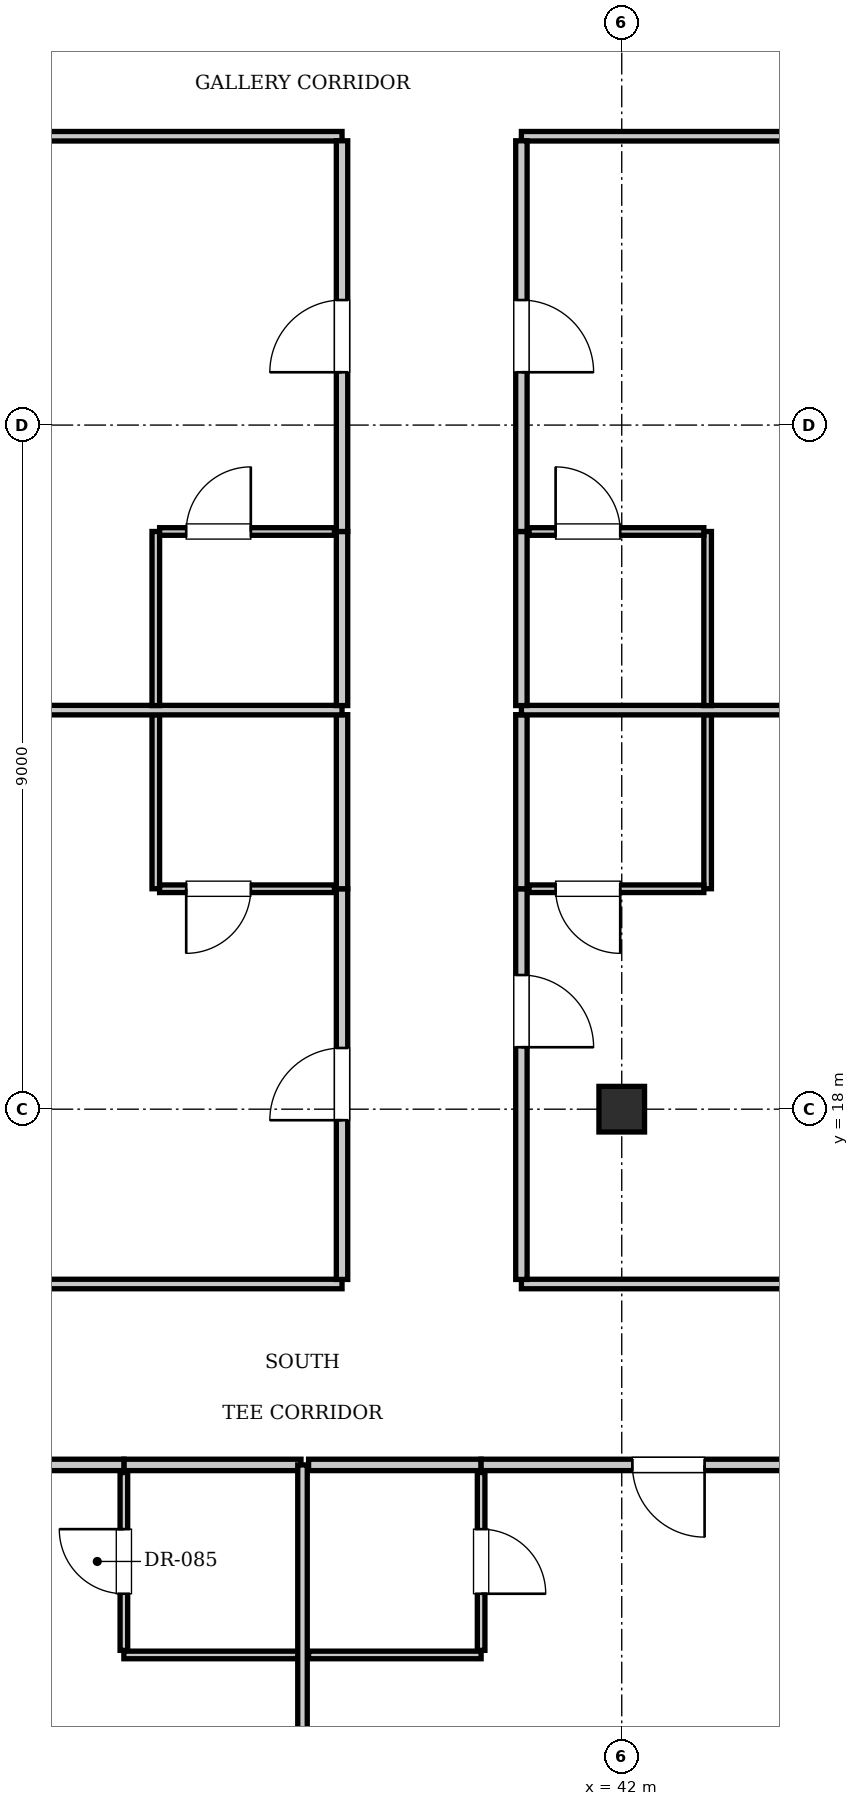
"""IFC4 building model, lengths in metres.
Left out: names, types, materials, properties, quantities, classifications, styles, units other than length and angle.
Written with IfcOpenShell. Run it as: python <this file> out.ifc"""

import sys

from ifc_helpers import new_model, si_unit, direction, frame, frame_2d, origin, origin_2d, place, context, subcontext, project, spatial, rectangle, i_section, extrude, element, fill, save


model = new_model("IFC4")
c1 = context("Model", 3, precision=1e-05, world=origin(), true_north=direction((0.0, 1.0)))
c2 = subcontext(c1, "Body", "Model", "MODEL_VIEW")
j1 = project(units=[si_unit("LENGTHUNIT", "METRE"), si_unit("PLANEANGLEUNIT", "RADIAN")], contexts=[c1])
p1 = place(None, origin())
s1 = spatial("IfcSite", under=j1, at=p1, CompositionType="ELEMENT")
p2 = place(p1, origin())
s2 = spatial("IfcBuilding", under=s1, at=p2, CompositionType="ELEMENT")
p3 = place(p2, frame((0.0, 0.0, 204.4)))
s3 = spatial("IfcBuildingStorey", under=s2, at=p3, CompositionType="ELEMENT", Elevation=204.4)
p4 = place(p3, frame((42.0, 18.0, 0.0), z_axis=(0.0, 0.0, 1.0), x_axis=(1.0, 0.0, 0.0)))
e1 = element("IfcColumn", 1, at=p4, inside=s3, PredefinedType="COLUMN", context=c2, shape_type="SweptSolid", body=[
    extrude(i_section(OverallWidth=0.6, OverallDepth=0.6, WebThickness=0.025, FlangeThickness=0.038, at=origin_2d()), origin(), (0.0, 0.0, 1.0), 3.85),
])
p5 = place(p3, frame((35.45, 13.32, 0.0), z_axis=(0.0, 0.0, 1.0), x_axis=(1.0, 0.0, 0.0)))
e2 = element("IfcWall", 2, at=p5, inside=s3, PredefinedType="PARTITIONING", context=c2, shape_type="SweptSolid", body=[
    extrude(rectangle(XDim=2.33, YDim=0.15, at=frame_2d((1.165, 0.0))), origin(), (0.0, 0.0, 1.0), 3.61),
])
p6 = place(p3, frame((35.45, 10.82, 0.0), z_axis=(0.0, 0.0, 1.0), x_axis=(1.0, 0.0, 0.0)))
e3 = element("IfcWall", 3, at=p6, inside=s3, PredefinedType="PARTITIONING", context=c2, shape_type="SweptSolid", body=[
    extrude(rectangle(XDim=2.31, YDim=0.1, at=frame_2d((1.155, 0.0))), origin(), (0.0, 0.0, 1.0), 3.61),
])
p7 = place(p3, frame((35.45, 10.88, 0.0), z_axis=(0.0, 0.0, 1.0), x_axis=(0.0, 1.0, 0.0)))
e4 = element("IfcWall", 4, at=p7, inside=s3, PredefinedType="PARTITIONING", context=c2, shape_type="SweptSolid", body=[
    extrude(rectangle(XDim=2.34, YDim=0.1, at=frame_2d((1.17, 0.0))), origin(), (0.0, 0.0, 1.0), 3.61),
])
p8 = place(p7, frame((0.745, 0.0, 0.0)))
e5 = element("IfcOpeningElement", 5, at=p8, cuts=e4, PredefinedType="OPENING", context=c2, shape_type="SweptSolid", body=[
    extrude(rectangle(XDim=0.85, YDim=2.1, at=frame_2d((0.425, 1.05))), frame((0.0, 0.06, 0.0), z_axis=(0.0, -1.0, 0.0), x_axis=(1.0, 0.0, 0.0)), (0.0, 0.0, 1.0), 0.12),
])
p9 = place(p3, frame((30.58, 13.32, 0.0), z_axis=(0.0, 0.0, 1.0), x_axis=(1.0, 0.0, 0.0)))
e6 = element("IfcWall", 6, at=p9, inside=s3, PredefinedType="PARTITIONING", context=c2, shape_type="SweptSolid", body=[
    extrude(rectangle(XDim=4.87, YDim=0.15, at=frame_2d((2.435, 0.0))), origin(), (0.0, 0.0, 1.0), 3.61),
])
p10 = place(p9, frame((1.96, 0.0, 0.0)))
e7 = element("IfcOpeningElement", 7, at=p10, cuts=e6, PredefinedType="OPENING", context=c2, shape_type="SweptSolid", body=[
    extrude(rectangle(XDim=0.95, YDim=2.15, at=frame_2d((0.475, 1.075))), frame((0.0, 0.085, 0.0), z_axis=(0.0, -1.0, 0.0), x_axis=(1.0, 0.0, 0.0)), (0.0, 0.0, 1.0), 0.17),
])
p11 = place(p3, frame((37.8, 4.7, 0.0), z_axis=(0.0, 0.0, 1.0), x_axis=(0.0, 1.0, 0.0)))
e8 = element("IfcWall", 8, at=p11, inside=s3, PredefinedType="PARTITIONING", context=c2, shape_type="SweptSolid", body=[
    extrude(rectangle(XDim=8.62, YDim=0.125, at=frame_2d((4.31, 0.0))), origin(), (0.0, 0.0, 1.0), 3.403),
])
p12 = place(p3, frame((37.88, 13.32, 0.0), z_axis=(0.0, 0.0, 1.0), x_axis=(1.0, 0.0, 0.0)))
e9 = element("IfcWall", 9, at=p12, inside=s3, PredefinedType="PARTITIONING", context=c2, shape_type="SweptSolid", body=[
    extrude(rectangle(XDim=2.27, YDim=0.15, at=frame_2d((1.135, 0.0))), origin(), (0.0, 0.0, 1.0), 3.61),
])
p13 = place(p3, frame((37.88, 10.82, 0.0), z_axis=(0.0, 0.0, 1.0), x_axis=(1.0, 0.0, 0.0)))
e10 = element("IfcWall", 10, at=p13, inside=s3, PredefinedType="PARTITIONING", context=c2, shape_type="SweptSolid", body=[
    extrude(rectangle(XDim=2.27, YDim=0.1, at=frame_2d((1.135, 0.0))), origin(), (0.0, 0.0, 1.0), 3.61),
])
p14 = place(p3, frame((40.15, 10.88, 0.0), z_axis=(0.0, 0.0, 1.0), x_axis=(0.0, 1.0, 0.0)))
e11 = element("IfcWall", 11, at=p14, inside=s3, PredefinedType="PARTITIONING", context=c2, shape_type="SweptSolid", body=[
    extrude(rectangle(XDim=2.34, YDim=0.1, at=frame_2d((1.17, 0.0))), origin(), (0.0, 0.0, 1.0), 3.61),
])
p15 = place(p14, frame((0.745, 0.0, 0.0)))
e12 = element("IfcOpeningElement", 12, at=p15, cuts=e11, PredefinedType="OPENING", context=c2, shape_type="SweptSolid", body=[
    extrude(rectangle(XDim=0.85, YDim=2.1, at=frame_2d((0.425, 1.05))), frame((0.0, 0.06, 0.0), z_axis=(0.0, -1.0, 0.0), x_axis=(1.0, 0.0, 0.0)), (0.0, 0.0, 1.0), 0.12),
])
p16 = place(p3, frame((40.15, 13.32, 0.0), z_axis=(0.0, 0.0, 1.0), x_axis=(1.0, 0.0, 0.0)))
e13 = element("IfcWall", 13, at=p16, inside=s3, PredefinedType="PARTITIONING", context=c2, shape_type="SweptSolid", body=[
    extrude(rectangle(XDim=4.93, YDim=0.15, at=frame_2d((2.465, 0.0))), origin(), (0.0, 0.0, 1.0), 3.61),
])
p17 = place(p16, frame((1.99, 0.0, 0.0)))
e14 = element("IfcOpeningElement", 14, at=p17, cuts=e13, PredefinedType="OPENING", context=c2, shape_type="SweptSolid", body=[
    extrude(rectangle(XDim=0.95, YDim=2.15, at=frame_2d((0.475, 1.075))), frame((0.0, 0.085, 0.0), z_axis=(0.0, -1.0, 0.0), x_axis=(1.0, 0.0, 0.0)), (0.0, 0.0, 1.0), 0.17),
])
p18 = place(p3, frame((13.2, 15.7, 0.0), z_axis=(0.0, 0.0, 1.0), x_axis=(1.0, 0.0, 0.0)))
e15 = element("IfcWall", 15, at=p18, inside=s3, PredefinedType="PARTITIONING", context=c2, shape_type="SweptSolid", body=[
    extrude(rectangle(XDim=25.12, YDim=0.125, at=frame_2d((12.56, 0.0))), origin(), (0.0, 0.0, 1.0), 3.61),
])
p19 = place(p3, frame((40.68, 15.7, 0.0), z_axis=(0.0, 0.0, 1.0), x_axis=(1.0, 0.0, 0.0)))
e16 = element("IfcWall", 16, at=p19, inside=s3, PredefinedType="PARTITIONING", context=c2, shape_type="SweptSolid", body=[
    extrude(rectangle(XDim=21.72, YDim=0.125, at=frame_2d((10.86, 0.0))), origin(), (0.0, 0.0, 1.0), 3.61),
])
p20 = place(p3, frame((13.2, 30.8, 0.0), z_axis=(0.0, 0.0, 1.0), x_axis=(1.0, 0.0, 0.0)))
e17 = element("IfcWall", 17, at=p20, inside=s3, PredefinedType="PARTITIONING", context=c2, shape_type="SweptSolid", body=[
    extrude(rectangle(XDim=25.12, YDim=0.125, at=frame_2d((12.56, 0.0))), origin(), (0.0, 0.0, 1.0), 3.61),
])
p21 = place(p3, frame((40.68, 30.8, 0.0), z_axis=(0.0, 0.0, 1.0), x_axis=(1.0, 0.0, 0.0)))
e18 = element("IfcWall", 18, at=p21, inside=s3, PredefinedType="PARTITIONING", context=c2, shape_type="SweptSolid", body=[
    extrude(rectangle(XDim=21.72, YDim=0.125, at=frame_2d((10.86, 0.0))), origin(), (0.0, 0.0, 1.0), 3.61),
])
p22 = place(p3, frame((38.32, 15.76, 0.0), z_axis=(0.0, 0.0, 1.0), x_axis=(0.0, 1.0, 0.0)))
e19 = element("IfcWall", 19, at=p22, inside=s3, PredefinedType="PARTITIONING", context=c2, shape_type="SweptSolid", body=[
    extrude(rectangle(XDim=5.14, YDim=0.15, at=frame_2d((2.57, 0.0))), origin(), (0.0, 0.0, 1.0), 3.61),
])
p23 = place(p22, frame((2.095, 0.0, 0.0)))
e20 = element("IfcOpeningElement", 20, at=p23, cuts=e19, PredefinedType="OPENING", context=c2, shape_type="SweptSolid", body=[
    extrude(rectangle(XDim=0.95, YDim=2.15, at=frame_2d((0.475, 1.075))), frame((0.0, 0.085, 0.0), z_axis=(0.0, -1.0, 0.0), x_axis=(1.0, 0.0, 0.0)), (0.0, 0.0, 1.0), 0.17),
])
p24 = place(p3, frame((38.32, 20.9, 0.0), z_axis=(0.0, 0.0, 1.0), x_axis=(0.0, 1.0, 0.0)))
e21 = element("IfcWall", 21, at=p24, inside=s3, PredefinedType="PARTITIONING", context=c2, shape_type="SweptSolid", body=[
    extrude(rectangle(XDim=2.29, YDim=0.15, at=frame_2d((1.145, 0.0))), origin(), (0.0, 0.0, 1.0), 3.61),
])
p25 = place(p3, frame((35.87, 20.9, 0.0), z_axis=(0.0, 0.0, 1.0), x_axis=(0.0, 1.0, 0.0)))
e22 = element("IfcWall", 22, at=p25, inside=s3, PredefinedType="PARTITIONING", context=c2, shape_type="SweptSolid", body=[
    extrude(rectangle(XDim=2.29, YDim=0.1, at=frame_2d((1.145, 0.0))), origin(), (0.0, 0.0, 1.0), 3.61),
])
p26 = place(p3, frame((35.92, 20.9, 0.0), z_axis=(0.0, 0.0, 1.0), x_axis=(1.0, 0.0, 0.0)))
e23 = element("IfcWall", 23, at=p26, inside=s3, PredefinedType="PARTITIONING", context=c2, shape_type="SweptSolid", body=[
    extrude(rectangle(XDim=2.3, YDim=0.1, at=frame_2d((1.15, 0.0))), origin(), (0.0, 0.0, 1.0), 3.61),
])
p27 = place(p26, frame((0.35, 0.0, 0.0)))
e24 = element("IfcOpeningElement", 24, at=p27, cuts=e23, PredefinedType="OPENING", context=c2, shape_type="SweptSolid", body=[
    extrude(rectangle(XDim=0.85, YDim=2.1, at=frame_2d((0.425, 1.05))), frame((0.0, 0.06, 0.0), z_axis=(0.0, -1.0, 0.0), x_axis=(1.0, 0.0, 0.0)), (0.0, 0.0, 1.0), 0.12),
])
p28 = place(p3, frame((40.68, 15.76, 0.0), z_axis=(0.0, 0.0, 1.0), x_axis=(0.0, 1.0, 0.0)))
e25 = element("IfcWall", 25, at=p28, inside=s3, PredefinedType="PARTITIONING", context=c2, shape_type="SweptSolid", body=[
    extrude(rectangle(XDim=5.14, YDim=0.15, at=frame_2d((2.57, 0.0))), origin(), (0.0, 0.0, 1.0), 3.61),
])
p29 = place(p28, frame((3.055, 0.0, 0.0)))
e26 = element("IfcOpeningElement", 26, at=p29, cuts=e25, PredefinedType="OPENING", context=c2, shape_type="SweptSolid", body=[
    extrude(rectangle(XDim=0.95, YDim=2.15, at=frame_2d((0.475, 1.075))), frame((0.0, 0.085, 0.0), z_axis=(0.0, -1.0, 0.0), x_axis=(1.0, 0.0, 0.0)), (0.0, 0.0, 1.0), 0.17),
])
p30 = place(p3, frame((40.68, 20.9, 0.0), z_axis=(0.0, 0.0, 1.0), x_axis=(0.0, 1.0, 0.0)))
e27 = element("IfcWall", 27, at=p30, inside=s3, PredefinedType="PARTITIONING", context=c2, shape_type="SweptSolid", body=[
    extrude(rectangle(XDim=2.29, YDim=0.15, at=frame_2d((1.145, 0.0))), origin(), (0.0, 0.0, 1.0), 3.61),
])
p31 = place(p3, frame((43.13, 20.9, 0.0), z_axis=(0.0, 0.0, 1.0), x_axis=(0.0, 1.0, 0.0)))
e28 = element("IfcWall", 28, at=p31, inside=s3, PredefinedType="PARTITIONING", context=c2, shape_type="SweptSolid", body=[
    extrude(rectangle(XDim=2.29, YDim=0.1, at=frame_2d((1.145, 0.0))), origin(), (0.0, 0.0, 1.0), 3.61),
])
p32 = place(p3, frame((40.78, 20.9, 0.0), z_axis=(0.0, 0.0, 1.0), x_axis=(1.0, 0.0, 0.0)))
e29 = element("IfcWall", 29, at=p32, inside=s3, PredefinedType="PARTITIONING", context=c2, shape_type="SweptSolid", body=[
    extrude(rectangle(XDim=2.3, YDim=0.1, at=frame_2d((1.15, 0.0))), origin(), (0.0, 0.0, 1.0), 3.61),
])
p33 = place(p32, frame((0.35, 0.0, 0.0)))
e30 = element("IfcOpeningElement", 30, at=p33, cuts=e29, PredefinedType="OPENING", context=c2, shape_type="SweptSolid", body=[
    extrude(rectangle(XDim=0.85, YDim=2.1, at=frame_2d((0.425, 1.05))), frame((0.0, 0.06, 0.0), z_axis=(0.0, -1.0, 0.0), x_axis=(1.0, 0.0, 0.0)), (0.0, 0.0, 1.0), 0.12),
])
p34 = place(p3, frame((13.2, 23.25, 0.0), z_axis=(0.0, 0.0, 1.0), x_axis=(1.0, 0.0, 0.0)))
e31 = element("IfcWall", 31, at=p34, inside=s3, PredefinedType="PARTITIONING", context=c2, shape_type="SweptSolid", body=[
    extrude(rectangle(XDim=25.12, YDim=0.125, at=frame_2d((12.56, 0.0))), origin(), (0.0, 0.0, 1.0), 3.61),
])
p35 = place(p3, frame((40.68, 23.25, 0.0), z_axis=(0.0, 0.0, 1.0), x_axis=(1.0, 0.0, 0.0)))
e32 = element("IfcWall", 32, at=p35, inside=s3, PredefinedType="PARTITIONING", context=c2, shape_type="SweptSolid", body=[
    extrude(rectangle(XDim=21.72, YDim=0.125, at=frame_2d((10.86, 0.0))), origin(), (0.0, 0.0, 1.0), 3.61),
])
p36 = place(p3, frame((38.32, 23.31, 0.0), z_axis=(0.0, 0.0, 1.0), x_axis=(0.0, 1.0, 0.0)))
e33 = element("IfcWall", 33, at=p36, inside=s3, PredefinedType="PARTITIONING", context=c2, shape_type="SweptSolid", body=[
    extrude(rectangle(XDim=2.29, YDim=0.15, at=frame_2d((1.145, 0.0))), origin(), (0.0, 0.0, 1.0), 3.61),
])
p37 = place(p3, frame((38.32, 25.6, 0.0), z_axis=(0.0, 0.0, 1.0), x_axis=(0.0, 1.0, 0.0)))
e34 = element("IfcWall", 34, at=p37, inside=s3, PredefinedType="PARTITIONING", context=c2, shape_type="SweptSolid", body=[
    extrude(rectangle(XDim=5.14, YDim=0.15, at=frame_2d((2.57, 0.0))), origin(), (0.0, 0.0, 1.0), 3.61),
])
p38 = place(p37, frame((2.095, 0.0, 0.0)))
e35 = element("IfcOpeningElement", 35, at=p38, cuts=e34, PredefinedType="OPENING", context=c2, shape_type="SweptSolid", body=[
    extrude(rectangle(XDim=0.95, YDim=2.15, at=frame_2d((0.475, 1.075))), frame((0.0, 0.085, 0.0), z_axis=(0.0, -1.0, 0.0), x_axis=(1.0, 0.0, 0.0)), (0.0, 0.0, 1.0), 0.17),
])
p39 = place(p3, frame((35.87, 23.31, 0.0), z_axis=(0.0, 0.0, 1.0), x_axis=(0.0, 1.0, 0.0)))
e36 = element("IfcWall", 36, at=p39, inside=s3, PredefinedType="PARTITIONING", context=c2, shape_type="SweptSolid", body=[
    extrude(rectangle(XDim=2.29, YDim=0.1, at=frame_2d((1.145, 0.0))), origin(), (0.0, 0.0, 1.0), 3.61),
])
p40 = place(p3, frame((35.92, 25.6, 0.0), z_axis=(0.0, 0.0, 1.0), x_axis=(1.0, 0.0, 0.0)))
e37 = element("IfcWall", 37, at=p40, inside=s3, PredefinedType="PARTITIONING", context=c2, shape_type="SweptSolid", body=[
    extrude(rectangle(XDim=2.3, YDim=0.1, at=frame_2d((1.15, 0.0))), origin(), (0.0, 0.0, 1.0), 3.61),
])
p41 = place(p40, frame((0.35, 0.0, 0.0)))
e38 = element("IfcOpeningElement", 38, at=p41, cuts=e37, PredefinedType="OPENING", context=c2, shape_type="SweptSolid", body=[
    extrude(rectangle(XDim=0.85, YDim=2.1, at=frame_2d((0.425, 1.05))), frame((0.0, 0.06, 0.0), z_axis=(0.0, -1.0, 0.0), x_axis=(1.0, 0.0, 0.0)), (0.0, 0.0, 1.0), 0.12),
])
p42 = place(p3, frame((40.68, 23.31, 0.0), z_axis=(0.0, 0.0, 1.0), x_axis=(0.0, 1.0, 0.0)))
e39 = element("IfcWall", 39, at=p42, inside=s3, PredefinedType="PARTITIONING", context=c2, shape_type="SweptSolid", body=[
    extrude(rectangle(XDim=2.29, YDim=0.15, at=frame_2d((1.145, 0.0))), origin(), (0.0, 0.0, 1.0), 3.61),
])
p43 = place(p3, frame((40.68, 25.6, 0.0), z_axis=(0.0, 0.0, 1.0), x_axis=(0.0, 1.0, 0.0)))
e40 = element("IfcWall", 40, at=p43, inside=s3, PredefinedType="PARTITIONING", context=c2, shape_type="SweptSolid", body=[
    extrude(rectangle(XDim=5.14, YDim=0.15, at=frame_2d((2.57, 0.0))), origin(), (0.0, 0.0, 1.0), 3.61),
])
p44 = place(p43, frame((2.095, 0.0, 0.0)))
e41 = element("IfcOpeningElement", 41, at=p44, cuts=e40, PredefinedType="OPENING", context=c2, shape_type="SweptSolid", body=[
    extrude(rectangle(XDim=0.95, YDim=2.15, at=frame_2d((0.475, 1.075))), frame((0.0, 0.085, 0.0), z_axis=(0.0, -1.0, 0.0), x_axis=(1.0, 0.0, 0.0)), (0.0, 0.0, 1.0), 0.17),
])
p45 = place(p3, frame((43.13, 23.31, 0.0), z_axis=(0.0, 0.0, 1.0), x_axis=(0.0, 1.0, 0.0)))
e42 = element("IfcWall", 42, at=p45, inside=s3, PredefinedType="PARTITIONING", context=c2, shape_type="SweptSolid", body=[
    extrude(rectangle(XDim=2.29, YDim=0.1, at=frame_2d((1.145, 0.0))), origin(), (0.0, 0.0, 1.0), 3.61),
])
p46 = place(p3, frame((40.78, 25.6, 0.0), z_axis=(0.0, 0.0, 1.0), x_axis=(1.0, 0.0, 0.0)))
e43 = element("IfcWall", 43, at=p46, inside=s3, PredefinedType="PARTITIONING", context=c2, shape_type="SweptSolid", body=[
    extrude(rectangle(XDim=2.3, YDim=0.1, at=frame_2d((1.15, 0.0))), origin(), (0.0, 0.0, 1.0), 3.61),
])
p47 = place(p46, frame((0.35, 0.0, 0.0)))
e44 = element("IfcOpeningElement", 44, at=p47, cuts=e43, PredefinedType="OPENING", context=c2, shape_type="SweptSolid", body=[
    extrude(rectangle(XDim=0.85, YDim=2.1, at=frame_2d((0.425, 1.05))), frame((0.0, 0.06, 0.0), z_axis=(0.0, -1.0, 0.0), x_axis=(1.0, 0.0, 0.0)), (0.0, 0.0, 1.0), 0.12),
])
p48 = place(p8, origin())
e45 = element("IfcDoor", 45, at=p48, inside=s3, OperationType="SINGLE_SWING_RIGHT", PredefinedType="DOOR", context=c2, shape_type="SweptSolid", body=[
    extrude(rectangle(XDim=0.85, YDim=2.1, at=frame_2d((0.425, 1.05))), frame((0.0, 0.025, 0.0), z_axis=(0.0, -1.0, 0.0), x_axis=(1.0, 0.0, 0.0)), (0.0, 0.0, 1.0), 0.05),
])
fill(e5, e45)
p49 = place(p15, frame((0.85, 0.0, 0.0), z_axis=(0.0, 0.0, 1.0), x_axis=(-1.0, 0.0, 0.0)))
e46 = element("IfcDoor", 46, at=p49, inside=s3, OperationType="SINGLE_SWING_RIGHT", PredefinedType="DOOR", context=c2, shape_type="SweptSolid", body=[
    extrude(rectangle(XDim=0.85, YDim=2.1, at=frame_2d((0.425, 1.05))), frame((0.0, 0.025, 0.0), z_axis=(0.0, -1.0, 0.0), x_axis=(1.0, 0.0, 0.0)), (0.0, 0.0, 1.0), 0.05),
])
fill(e12, e46)
p50 = place(p17, frame((0.95, 0.0, 0.0), z_axis=(0.0, 0.0, 1.0), x_axis=(-1.0, 0.0, 0.0)))
e47 = element("IfcDoor", 47, at=p50, inside=s3, OperationType="SINGLE_SWING_LEFT", PredefinedType="DOOR", context=c2, shape_type="SweptSolid", body=[
    extrude(rectangle(XDim=0.95, YDim=2.15, at=frame_2d((0.475, 1.075))), frame((0.0, 0.025, 0.0), z_axis=(0.0, -1.0, 0.0), x_axis=(1.0, 0.0, 0.0)), (0.0, 0.0, 1.0), 0.05),
])
fill(e14, e47)
p51 = place(p27, frame((0.85, 0.0, 0.0), z_axis=(0.0, 0.0, 1.0), x_axis=(-1.0, 0.0, 0.0)))
e48 = element("IfcDoor", 48, at=p51, inside=s3, OperationType="SINGLE_SWING_RIGHT", PredefinedType="DOOR", context=c2, shape_type="SweptSolid", body=[
    extrude(rectangle(XDim=0.85, YDim=2.1, at=frame_2d((0.425, 1.05))), frame((0.0, 0.025, 0.0), z_axis=(0.0, -1.0, 0.0), x_axis=(1.0, 0.0, 0.0)), (0.0, 0.0, 1.0), 0.05),
])
fill(e24, e48)
p52 = place(p23, origin())
e49 = element("IfcDoor", 49, at=p52, inside=s3, OperationType="SINGLE_SWING_LEFT", PredefinedType="DOOR", context=c2, shape_type="SweptSolid", body=[
    extrude(rectangle(XDim=0.95, YDim=2.15, at=frame_2d((0.475, 1.075))), frame((0.0, 0.025, 0.0), z_axis=(0.0, -1.0, 0.0), x_axis=(1.0, 0.0, 0.0)), (0.0, 0.0, 1.0), 0.05),
])
fill(e20, e49)
p53 = place(p33, frame((0.85, 0.0, 0.0), z_axis=(0.0, 0.0, 1.0), x_axis=(-1.0, 0.0, 0.0)))
e50 = element("IfcDoor", 50, at=p53, inside=s3, OperationType="SINGLE_SWING_LEFT", PredefinedType="DOOR", context=c2, shape_type="SweptSolid", body=[
    extrude(rectangle(XDim=0.85, YDim=2.1, at=frame_2d((0.425, 1.05))), frame((0.0, 0.025, 0.0), z_axis=(0.0, -1.0, 0.0), x_axis=(1.0, 0.0, 0.0)), (0.0, 0.0, 1.0), 0.05),
])
fill(e30, e50)
p54 = place(p29, frame((0.95, 0.0, 0.0), z_axis=(0.0, 0.0, 1.0), x_axis=(-1.0, 0.0, 0.0)))
e51 = element("IfcDoor", 51, at=p54, inside=s3, OperationType="SINGLE_SWING_RIGHT", PredefinedType="DOOR", context=c2, shape_type="SweptSolid", body=[
    extrude(rectangle(XDim=0.95, YDim=2.15, at=frame_2d((0.475, 1.075))), frame((0.0, 0.025, 0.0), z_axis=(0.0, -1.0, 0.0), x_axis=(1.0, 0.0, 0.0)), (0.0, 0.0, 1.0), 0.05),
])
fill(e26, e51)
p55 = place(p41, origin())
e52 = element("IfcDoor", 52, at=p55, inside=s3, OperationType="SINGLE_SWING_RIGHT", PredefinedType="DOOR", context=c2, shape_type="SweptSolid", body=[
    extrude(rectangle(XDim=0.85, YDim=2.1, at=frame_2d((0.425, 1.05))), frame((0.0, 0.025, 0.0), z_axis=(0.0, -1.0, 0.0), x_axis=(1.0, 0.0, 0.0)), (0.0, 0.0, 1.0), 0.05),
])
fill(e38, e52)
p56 = place(p38, origin())
e53 = element("IfcDoor", 53, at=p56, inside=s3, OperationType="SINGLE_SWING_LEFT", PredefinedType="DOOR", context=c2, shape_type="SweptSolid", body=[
    extrude(rectangle(XDim=0.95, YDim=2.15, at=frame_2d((0.475, 1.075))), frame((0.0, 0.025, 0.0), z_axis=(0.0, -1.0, 0.0), x_axis=(1.0, 0.0, 0.0)), (0.0, 0.0, 1.0), 0.05),
])
fill(e35, e53)
p57 = place(p47, origin())
e54 = element("IfcDoor", 54, at=p57, inside=s3, OperationType="SINGLE_SWING_LEFT", PredefinedType="DOOR", context=c2, shape_type="SweptSolid", body=[
    extrude(rectangle(XDim=0.85, YDim=2.1, at=frame_2d((0.425, 1.05))), frame((0.0, 0.025, 0.0), z_axis=(0.0, -1.0, 0.0), x_axis=(1.0, 0.0, 0.0)), (0.0, 0.0, 1.0), 0.05),
])
fill(e44, e54)
p58 = place(p44, frame((0.95, 0.0, 0.0), z_axis=(0.0, 0.0, 1.0), x_axis=(-1.0, 0.0, 0.0)))
e55 = element("IfcDoor", 55, at=p58, inside=s3, OperationType="SINGLE_SWING_RIGHT", PredefinedType="DOOR", context=c2, shape_type="SweptSolid", body=[
    extrude(rectangle(XDim=0.95, YDim=2.15, at=frame_2d((0.475, 1.075))), frame((0.0, 0.025, 0.0), z_axis=(0.0, -1.0, 0.0), x_axis=(1.0, 0.0, 0.0)), (0.0, 0.0, 1.0), 0.05),
])
fill(e41, e55)
save(model, sys.argv[1])
